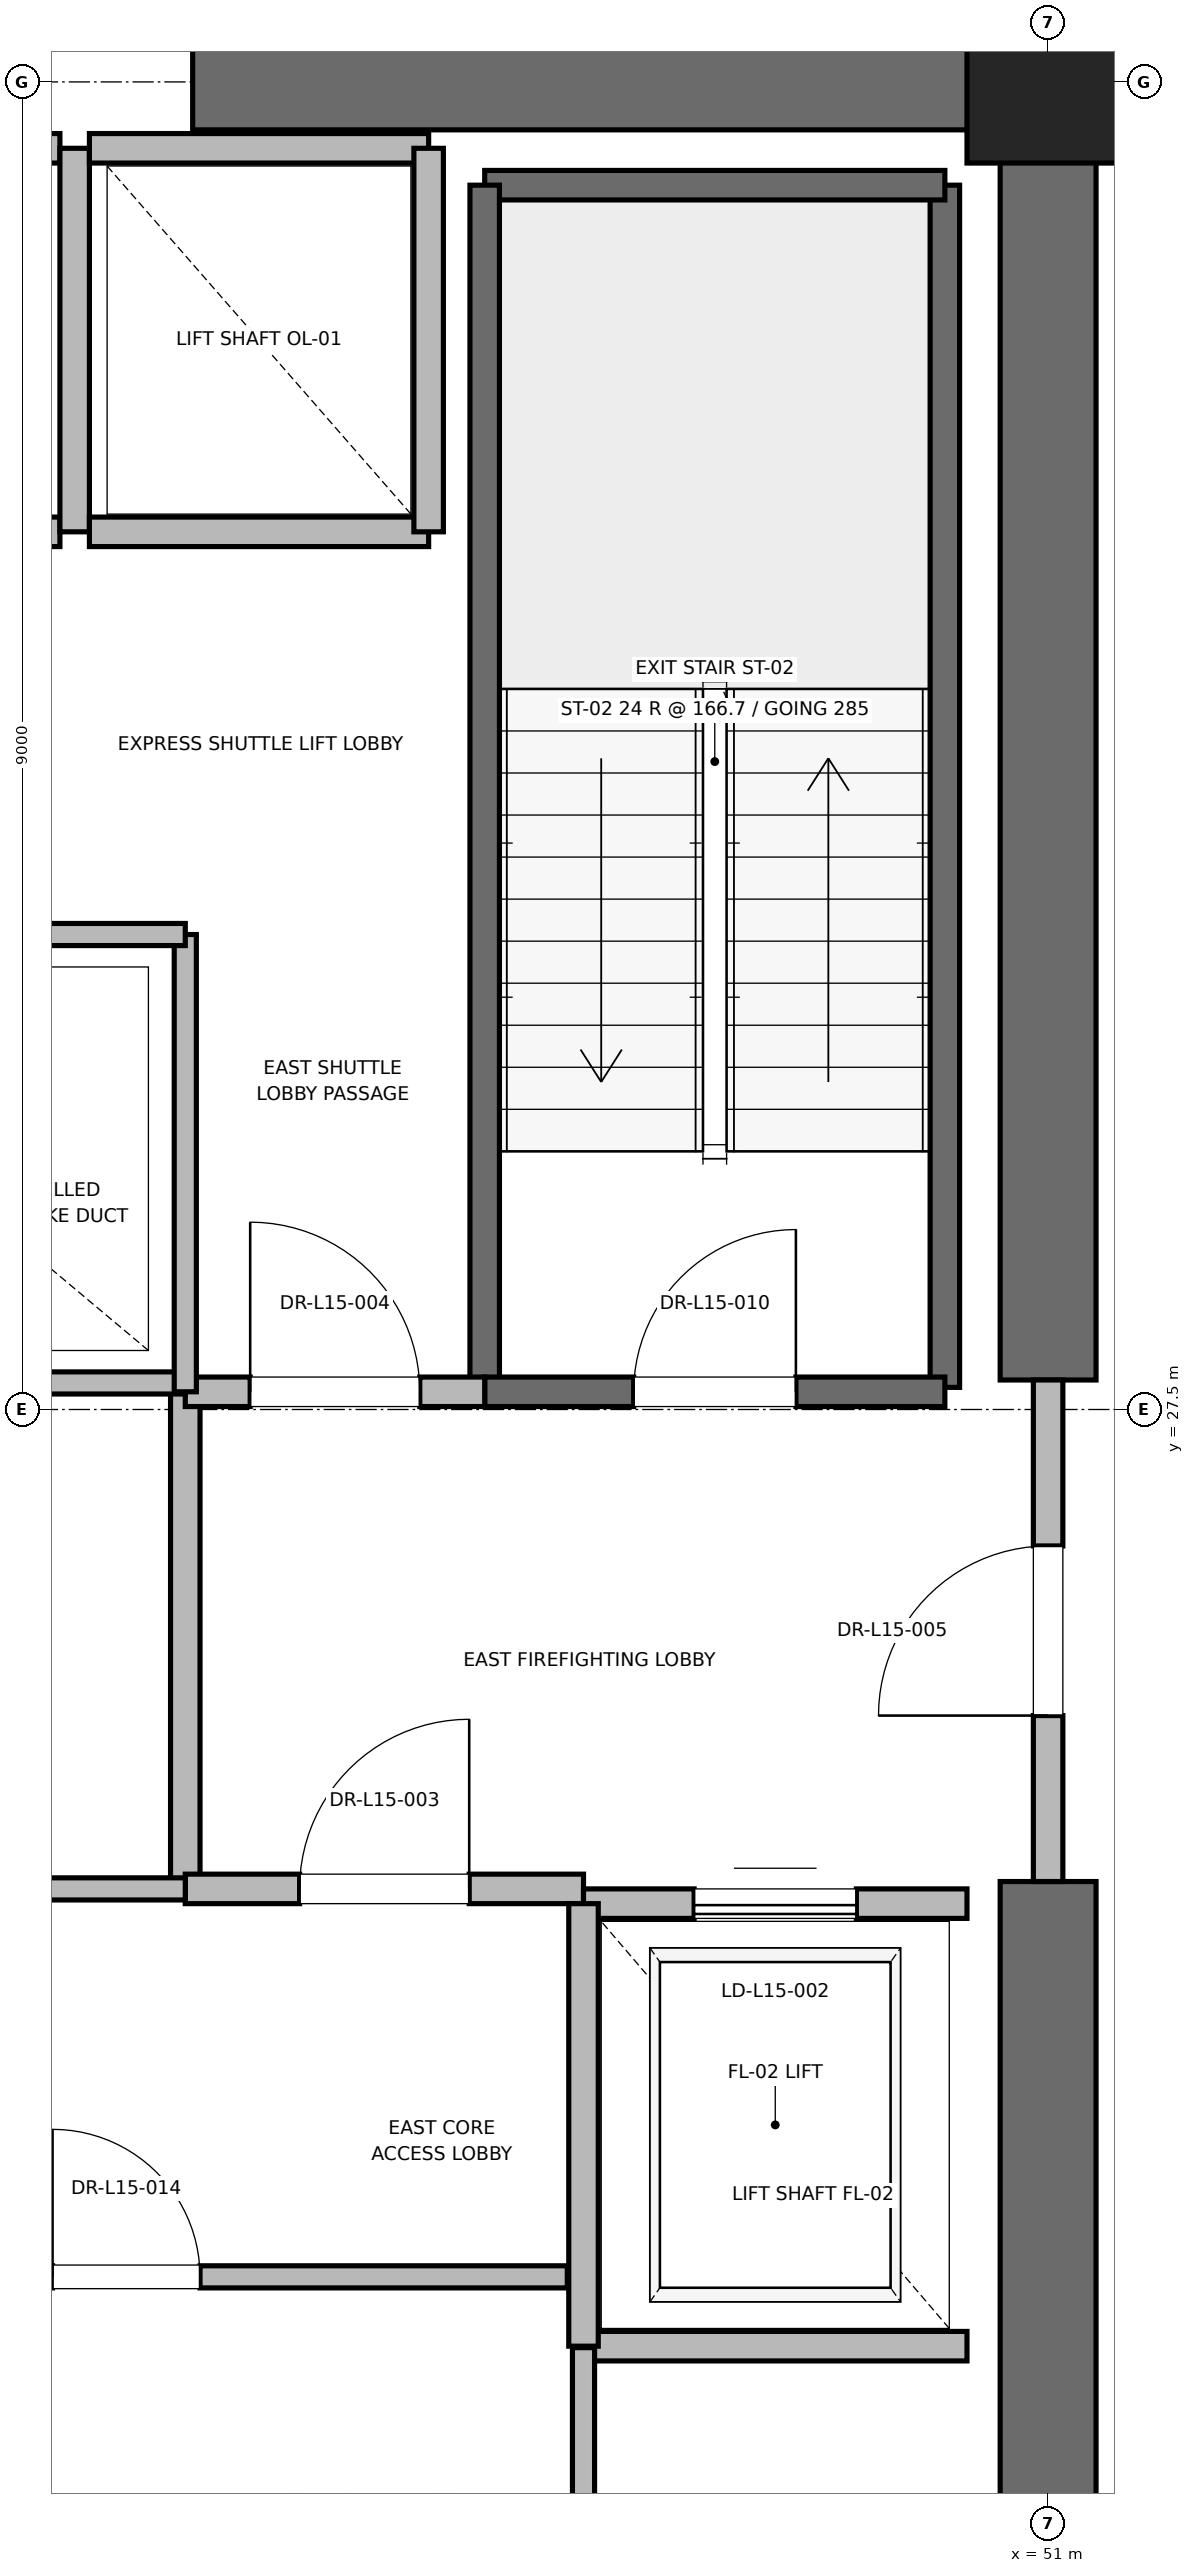
"""IFC4 building model, lengths in metres.
Left out: names, types, materials, properties, quantities, classifications, styles, units other than length and angle.
Written with IfcOpenShell. Run it as: python <this file> out.ifc"""

import sys

from ifc_helpers import new_model, si_unit, direction, frame, frame_2d, origin, origin_2d, place, context, subcontext, project, spatial, rectangle, extrude, element, fill, save


model = new_model("IFC4")
c1 = context("Model", 3, precision=1e-05, world=origin(), true_north=direction((0.0, 1.0)))
c2 = subcontext(c1, "Body", "Model", "MODEL_VIEW")
j1 = project(units=[si_unit("LENGTHUNIT", "METRE"), si_unit("PLANEANGLEUNIT", "RADIAN")], contexts=[c1])
p1 = place(None, origin())
s1 = spatial("IfcSite", under=j1, at=p1, CompositionType="ELEMENT")
p2 = place(p1, origin())
s2 = spatial("IfcBuilding", under=s1, at=p2, CompositionType="ELEMENT")
p3 = place(p2, frame((0.0, 0.0, 67.6)))
s3 = spatial("IfcBuildingStorey", under=s2, at=p3, CompositionType="ELEMENT", Elevation=67.6)
p4 = place(p3, frame((51.0, 36.5, 0.0), z_axis=(0.0, 0.0, 1.0), x_axis=(1.0, 0.0, 0.0)))
e1 = element("IfcColumn", 1, at=p4, inside=s3, PredefinedType="PILASTER", context=c2, shape_type="SweptSolid", body=[
    extrude(rectangle(XDim=1.1, YDim=1.1, at=origin_2d()), origin(), (0.0, 0.0, 1.0), 4.0),
])
for number, where, z_axis, x_axis in (
    (2, (45.2, 36.5, 0.0), (0.0, 0.0, 1.0), (1.0, 0.0, 0.0)),
    (3, (51.0, 18.5, 0.0), (0.0, 0.0, 1.0), (0.0, 1.0, 0.0)),
):
    element("IfcWall", number, at=place(p3, frame(where, z_axis=z_axis, x_axis=x_axis)), inside=s3, PredefinedType="SHEAR", context=c2, shape_type="SweptSolid", body=[
        extrude(rectangle(XDim=5.8, YDim=0.65, at=frame_2d((2.9, 0.0))), origin(), (0.0, 0.0, 1.0), 3.76),
    ])
p5 = place(p3, frame((51.0, 27.7, 0.0), z_axis=(0.0, 0.0, 1.0), x_axis=(0.0, 1.0, 0.0)))
e4 = element("IfcWall", 4, at=p5, inside=s3, PredefinedType="SHEAR", context=c2, shape_type="SweptSolid", body=[
    extrude(rectangle(XDim=8.8, YDim=0.65, at=frame_2d((4.4, 0.0))), origin(), (0.0, 0.0, 1.0), 3.76),
])
p6 = place(p3, frame((50.3, 27.65, 0.0), z_axis=(0.0, 0.0, 1.0), x_axis=(0.0, 1.0, 0.0)))
e5 = element("IfcWall", 5, at=p6, inside=s3, PredefinedType="SOLIDWALL", context=c2, shape_type="SweptSolid", body=[
    extrude(rectangle(XDim=8.15, YDim=0.2, at=frame_2d((4.075, 0.0))), origin(), (0.0, 0.0, 1.0), 3.76),
])
p7 = place(p3, frame((47.18, 35.8, 0.0), z_axis=(0.0, 0.0, 1.0), x_axis=(1.0, 0.0, 0.0)))
e6 = element("IfcWall", 6, at=p7, inside=s3, PredefinedType="SOLIDWALL", context=c2, shape_type="SweptSolid", body=[
    extrude(rectangle(XDim=3.12, YDim=0.2, at=frame_2d((1.56, 0.0))), origin(), (0.0, 0.0, 1.0), 3.76),
])
p8 = place(p3, frame((47.18, 27.62, 0.0), z_axis=(0.0, 0.0, 1.0), x_axis=(0.0, 1.0, 0.0)))
e7 = element("IfcWall", 7, at=p8, inside=s3, PredefinedType="SOLIDWALL", context=c2, shape_type="SweptSolid", body=[
    extrude(rectangle(XDim=8.18, YDim=0.2, at=frame_2d((4.09, 0.0))), origin(), (0.0, 0.0, 1.0), 3.76),
])
p9 = place(p3, frame((47.18, 27.62, 0.0), z_axis=(0.0, 0.0, 1.0), x_axis=(1.0, 0.0, 0.0)))
e8 = element("IfcWall", 8, at=p9, inside=s3, PredefinedType="SOLIDWALL", context=c2, shape_type="SweptSolid", body=[
    extrude(rectangle(XDim=3.12, YDim=0.2, at=frame_2d((1.56, 0.0))), origin(), (0.0, 0.0, 1.0), 3.76),
])
p10 = place(p9, frame((1.01, 0.0, 0.0)))
e9 = element("IfcOpeningElement", 9, at=p10, cuts=e8, PredefinedType="OPENING", context=c2, shape_type="SweptSolid", body=[
    extrude(rectangle(XDim=1.1, YDim=2.15, at=frame_2d((0.55, 1.075))), frame((0.0, 0.1, 0.0), z_axis=(0.0, -1.0, 0.0), x_axis=(1.0, 0.0, 0.0)), (0.0, 0.0, 1.0), 0.2),
])
p11 = place(p3, frame((45.15, 24.25, 0.0), z_axis=(0.0, 0.0, 1.0), x_axis=(0.0, 1.0, 0.0)))
e10 = element("IfcWall", 10, at=p11, inside=s3, PredefinedType="PARTITIONING", context=c2, shape_type="SweptSolid", body=[
    extrude(rectangle(XDim=3.37, YDim=0.2, at=frame_2d((1.685, 0.0))), origin(), (0.0, 0.0, 1.0), 3.76),
])
p12 = place(p3, frame((45.15, 24.25, 0.0), z_axis=(0.0, 0.0, 1.0), x_axis=(1.0, 0.0, 0.0)))
e11 = element("IfcWall", 11, at=p12, inside=s3, PredefinedType="PARTITIONING", context=c2, shape_type="SweptSolid", body=[
    extrude(rectangle(XDim=2.7, YDim=0.2, at=frame_2d((1.35, 0.0))), origin(), (0.0, 0.0, 1.0), 3.76),
])
p13 = place(p12, frame((0.775, 0.0, 0.0)))
e12 = element("IfcOpeningElement", 12, at=p13, cuts=e11, PredefinedType="OPENING", context=c2, shape_type="SweptSolid", body=[
    extrude(rectangle(XDim=1.15, YDim=2.2, at=frame_2d((0.575, 1.1))), frame((0.0, 0.1, 0.0), z_axis=(0.0, -1.0, 0.0), x_axis=(1.0, 0.0, 0.0)), (0.0, 0.0, 1.0), 0.2),
])
p14 = place(p3, frame((45.15, 27.62, 0.0), z_axis=(0.0, 0.0, 1.0), x_axis=(1.0, 0.0, 0.0)))
e13 = element("IfcWall", 13, at=p14, inside=s3, PredefinedType="PARTITIONING", context=c2, shape_type="SweptSolid", body=[
    extrude(rectangle(XDim=2.03, YDim=0.2, at=frame_2d((1.015, 0.0))), origin(), (0.0, 0.0, 1.0), 3.76),
])
p15 = place(p14, frame((0.44, 0.0, 0.0)))
e14 = element("IfcOpeningElement", 14, at=p15, cuts=e13, PredefinedType="OPENING", context=c2, shape_type="SweptSolid", body=[
    extrude(rectangle(XDim=1.15, YDim=2.2, at=frame_2d((0.575, 1.1))), frame((0.0, 0.1, 0.0), z_axis=(0.0, -1.0, 0.0), x_axis=(1.0, 0.0, 0.0)), (0.0, 0.0, 1.0), 0.2),
])
p16 = place(p3, frame((51.0, 24.3, 0.0), z_axis=(0.0, 0.0, 1.0), x_axis=(0.0, 1.0, 0.0)))
e15 = element("IfcWall", 15, at=p16, inside=s3, PredefinedType="PARTITIONING", context=c2, shape_type="SweptSolid", body=[
    extrude(rectangle(XDim=3.4, YDim=0.2, at=frame_2d((1.7, 0.0))), origin(), (0.0, 0.0, 1.0), 2.54),
])
p17 = place(p16, frame((1.125, 0.0, 0.0)))
e16 = element("IfcOpeningElement", 16, at=p17, cuts=e15, PredefinedType="OPENING", context=c2, shape_type="SweptSolid", body=[
    extrude(rectangle(XDim=1.15, YDim=2.2, at=frame_2d((0.575, 1.1))), frame((0.0, 0.1, 0.0), z_axis=(0.0, -1.0, 0.0), x_axis=(1.0, 0.0, 0.0)), (0.0, 0.0, 1.0), 0.2),
])
p18 = place(p3, frame((47.85, 21.15, 0.0), z_axis=(0.0, 0.0, 1.0), x_axis=(1.0, 0.0, 0.0)))
e17 = element("IfcWall", 17, at=p18, inside=s3, PredefinedType="SOLIDWALL", context=c2, shape_type="SweptSolid", body=[
    extrude(rectangle(XDim=2.6, YDim=0.2, at=frame_2d((1.3, 0.0))), origin(), (0.0, 0.0, 1.0), 3.76),
])
p19 = place(p3, frame((50.45, 24.15, 0.0), z_axis=(0.0, 0.0, 1.0), x_axis=(-1.0, 0.0, 0.0)))
e18 = element("IfcWall", 18, at=p19, inside=s3, PredefinedType="SOLIDWALL", context=c2, shape_type="SweptSolid", body=[
    extrude(rectangle(XDim=2.6, YDim=0.2, at=frame_2d((1.3, 0.0))), origin(), (0.0, 0.0, 1.0), 2.54),
])
p20 = place(p19, frame((0.75, 0.0, 0.0)))
e19 = element("IfcOpeningElement", 19, at=p20, cuts=e18, PredefinedType="OPENING", context=c2, shape_type="SweptSolid", body=[
    extrude(rectangle(XDim=1.1, YDim=2.2, at=frame_2d((0.55, 1.1))), frame((0.0, 0.1, 0.0), z_axis=(0.0, -1.0, 0.0), x_axis=(1.0, 0.0, 0.0)), (0.0, 0.0, 1.0), 0.2),
])
p21 = place(p3, frame((47.85, 24.15, 0.0), z_axis=(0.0, 0.0, 1.0), x_axis=(0.0, -1.0, 0.0)))
e20 = element("IfcWall", 20, at=p21, inside=s3, PredefinedType="SOLIDWALL", context=c2, shape_type="SweptSolid", body=[
    extrude(rectangle(XDim=3.0, YDim=0.2, at=frame_2d((1.5, 0.0))), origin(), (0.0, 0.0, 1.0), 3.76),
])
p22 = place(p3, frame((42.0, 33.45, 0.0), z_axis=(0.0, 0.0, 1.0), x_axis=(1.0, 0.0, 0.0)))
e21 = element("IfcWall", 21, at=p22, inside=s3, PredefinedType="SOLIDWALL", context=c2, shape_type="SweptSolid", body=[
    extrude(rectangle(XDim=2.3, YDim=0.2, at=frame_2d((1.15, 0.0))), origin(), (0.0, 0.0, 1.0), 3.76),
])
p23 = place(p3, frame((44.3, 36.05, 0.0), z_axis=(0.0, 0.0, 1.0), x_axis=(-1.0, 0.0, 0.0)))
e22 = element("IfcWall", 22, at=p23, inside=s3, PredefinedType="SOLIDWALL", context=c2, shape_type="SweptSolid", body=[
    extrude(rectangle(XDim=2.3, YDim=0.2, at=frame_2d((1.15, 0.0))), origin(), (0.0, 0.0, 1.0), 2.54),
])
p24 = place(p3, frame((44.4, 33.45, 0.0), z_axis=(0.0, 0.0, 1.0), x_axis=(0.0, 1.0, 0.0)))
e23 = element("IfcWall", 23, at=p24, inside=s3, PredefinedType="SOLIDWALL", context=c2, shape_type="SweptSolid", body=[
    extrude(rectangle(XDim=2.6, YDim=0.2, at=frame_2d((1.3, 0.0))), origin(), (0.0, 0.0, 1.0), 2.54),
])
p25 = place(p3, frame((44.5, 33.45, 0.0), z_axis=(0.0, 0.0, 1.0), x_axis=(1.0, 0.0, 0.0)))
e24 = element("IfcWall", 24, at=p25, inside=s3, PredefinedType="SOLIDWALL", context=c2, shape_type="SweptSolid", body=[
    extrude(rectangle(XDim=2.3, YDim=0.2, at=frame_2d((1.15, 0.0))), origin(), (0.0, 0.0, 1.0), 3.76),
])
p26 = place(p3, frame((46.8, 36.05, 0.0), z_axis=(0.0, 0.0, 1.0), x_axis=(-1.0, 0.0, 0.0)))
e25 = element("IfcWall", 25, at=p26, inside=s3, PredefinedType="SOLIDWALL", context=c2, shape_type="SweptSolid", body=[
    extrude(rectangle(XDim=2.3, YDim=0.2, at=frame_2d((1.15, 0.0))), origin(), (0.0, 0.0, 1.0), 2.54),
])
p27 = place(p3, frame((46.8, 33.45, 0.0), z_axis=(0.0, 0.0, 1.0), x_axis=(0.0, 1.0, 0.0)))
e26 = element("IfcWall", 26, at=p27, inside=s3, PredefinedType="SOLIDWALL", context=c2, shape_type="SweptSolid", body=[
    extrude(rectangle(XDim=2.6, YDim=0.2, at=frame_2d((1.3, 0.0))), origin(), (0.0, 0.0, 1.0), 3.76),
])
p28 = place(p3, frame((41.56, 27.68, 0.0), z_axis=(0.0, 0.0, 1.0), x_axis=(1.0, 0.0, 0.0)))
e27 = element("IfcWall", 27, at=p28, inside=s3, PredefinedType="PARTITIONING", context=c2, shape_type="SweptSolid", body=[
    extrude(rectangle(XDim=3.59, YDim=0.15, at=frame_2d((1.795, 0.0))), origin(), (0.0, 0.0, 1.0), 2.85),
])
p29 = place(p3, frame((47.85, 18.6, 0.0), z_axis=(0.0, 0.0, 1.0), x_axis=(0.0, 1.0, 0.0)))
e28 = element("IfcWall", 28, at=p29, inside=s3, PredefinedType="PARTITIONING", context=c2, shape_type="SweptSolid", body=[
    extrude(rectangle(XDim=2.54, YDim=0.15, at=frame_2d((1.27, 0.0))), origin(), (0.0, 0.0, 1.0), 2.85),
])
p30 = place(p3, frame((41.76, 21.62, 0.0), z_axis=(0.0, 0.0, 1.0), x_axis=(1.0, 0.0, 0.0)))
e29 = element("IfcWall", 29, at=p30, inside=s3, PredefinedType="PARTITIONING", context=c2, shape_type="SweptSolid", body=[
    extrude(rectangle(XDim=5.98, YDim=0.15, at=frame_2d((2.99, 0.0))), origin(), (0.0, 0.0, 1.0), 2.85),
])
p31 = place(p30, frame((2.49, 0.0, 0.0)))
e30 = element("IfcOpeningElement", 30, at=p31, cuts=e29, PredefinedType="OPENING", context=c2, shape_type="SweptSolid", body=[
    extrude(rectangle(XDim=1.0, YDim=2.15, at=frame_2d((0.5, 1.075))), frame((0.0, 0.075, 0.0), z_axis=(0.0, -1.0, 0.0), x_axis=(1.0, 0.0, 0.0)), (0.0, 0.0, 1.0), 0.15),
])
p32 = place(p3, frame((41.76, 24.25, 0.0), z_axis=(0.0, 0.0, 1.0), x_axis=(1.0, 0.0, 0.0)))
e31 = element("IfcWall", 31, at=p32, inside=s3, PredefinedType="PARTITIONING", context=c2, shape_type="SweptSolid", body=[
    extrude(rectangle(XDim=3.39, YDim=0.15, at=frame_2d((1.695, 0.0))), origin(), (0.0, 0.0, 1.0), 2.85),
])
p33 = place(p32, frame((1.195, 0.0, 0.0)))
e32 = element("IfcOpeningElement", 32, at=p33, cuts=e31, PredefinedType="OPENING", context=c2, shape_type="SweptSolid", body=[
    extrude(rectangle(XDim=1.0, YDim=2.15, at=frame_2d((0.5, 1.075))), frame((0.0, 0.075, 0.0), z_axis=(0.0, -1.0, 0.0), x_axis=(1.0, 0.0, 0.0)), (0.0, 0.0, 1.0), 0.15),
])
p34 = place(p3, frame((45.15, 27.62, 0.0), z_axis=(0.0, 0.0, 1.0), x_axis=(0.0, 1.0, 0.0)))
e33 = element("IfcWall", 33, at=p34, inside=s3, PredefinedType="PARTITIONING", context=c2, shape_type="SweptSolid", body=[
    extrude(rectangle(XDim=3.1, YDim=0.15, at=frame_2d((1.55, 0.0))), origin(), (0.0, 0.0, 1.0), 2.85),
])
p35 = place(p3, frame((41.56, 30.72, 0.0), z_axis=(0.0, 0.0, 1.0), x_axis=(1.0, 0.0, 0.0)))
e34 = element("IfcWall", 34, at=p35, inside=s3, PredefinedType="PARTITIONING", context=c2, shape_type="SweptSolid", body=[
    extrude(rectangle(XDim=3.59, YDim=0.15, at=frame_2d((1.795, 0.0))), origin(), (0.0, 0.0, 1.0), 2.85),
])
p36 = place(p35, frame((1.355, 0.0, 0.0)))
e35 = element("IfcOpeningElement", 35, at=p36, cuts=e34, PredefinedType="OPENING", context=c2, shape_type="SweptSolid", body=[
    extrude(rectangle(XDim=0.88, YDim=2.1, at=frame_2d((0.44, 1.05))), frame((0.0, 0.075, 0.0), z_axis=(0.0, -1.0, 0.0), x_axis=(1.0, 0.0, 0.0)), (0.0, 0.0, 1.0), 0.15),
])
p37 = place(p10, origin())
e36 = element("IfcDoor", 36, at=p37, inside=s3, OperationType="SINGLE_SWING_RIGHT", PredefinedType="DOOR", context=c2, shape_type="SweptSolid", body=[
    extrude(rectangle(XDim=1.1, YDim=2.15, at=frame_2d((0.55, 1.075))), frame((0.0, 0.025, 0.0), z_axis=(0.0, -1.0, 0.0), x_axis=(1.0, 0.0, 0.0)), (0.0, 0.0, 1.0), 0.05),
])
fill(e9, e36)
p38 = place(p13, origin())
e37 = element("IfcDoor", 37, at=p38, inside=s3, OperationType="SINGLE_SWING_RIGHT", PredefinedType="DOOR", context=c2, shape_type="SweptSolid", body=[
    extrude(rectangle(XDim=1.15, YDim=2.2, at=frame_2d((0.575, 1.1))), frame((0.0, 0.025, 0.0), z_axis=(0.0, -1.0, 0.0), x_axis=(1.0, 0.0, 0.0)), (0.0, 0.0, 1.0), 0.05),
])
fill(e12, e37)
p39 = place(p15, origin())
e38 = element("IfcDoor", 38, at=p39, inside=s3, OperationType="SINGLE_SWING_LEFT", PredefinedType="DOOR", context=c2, shape_type="SweptSolid", body=[
    extrude(rectangle(XDim=1.15, YDim=2.2, at=frame_2d((0.575, 1.1))), frame((0.0, 0.025, 0.0), z_axis=(0.0, -1.0, 0.0), x_axis=(1.0, 0.0, 0.0)), (0.0, 0.0, 1.0), 0.05),
])
fill(e14, e38)
p40 = place(p17, origin())
e39 = element("IfcDoor", 39, at=p40, inside=s3, OperationType="SINGLE_SWING_LEFT", PredefinedType="DOOR", context=c2, shape_type="SweptSolid", body=[
    extrude(rectangle(XDim=1.15, YDim=2.2, at=frame_2d((0.575, 1.1))), frame((0.0, 0.025, 0.0), z_axis=(0.0, -1.0, 0.0), x_axis=(1.0, 0.0, 0.0)), (0.0, 0.0, 1.0), 0.05),
])
fill(e16, e39)
p41 = place(p20, origin())
e40 = element("IfcDoor", 40, at=p41, inside=s3, OperationType="SLIDING_TO_RIGHT", PredefinedType="DOOR", context=c2, shape_type="SweptSolid", body=[
    extrude(rectangle(XDim=1.1, YDim=2.2, at=frame_2d((0.55, 1.1))), frame((0.0, 0.025, 0.0), z_axis=(0.0, -1.0, 0.0), x_axis=(1.0, 0.0, 0.0)), (0.0, 0.0, 1.0), 0.05),
])
fill(e19, e40)
p42 = place(p31, origin())
e41 = element("IfcDoor", 41, at=p42, inside=s3, OperationType="SINGLE_SWING_LEFT", PredefinedType="DOOR", context=c2, shape_type="SweptSolid", body=[
    extrude(rectangle(XDim=1.0, YDim=2.15, at=frame_2d((0.5, 1.075))), frame((0.0, 0.025, 0.0), z_axis=(0.0, -1.0, 0.0), x_axis=(1.0, 0.0, 0.0)), (0.0, 0.0, 1.0), 0.05),
])
fill(e30, e41)
save(model, sys.argv[1])
